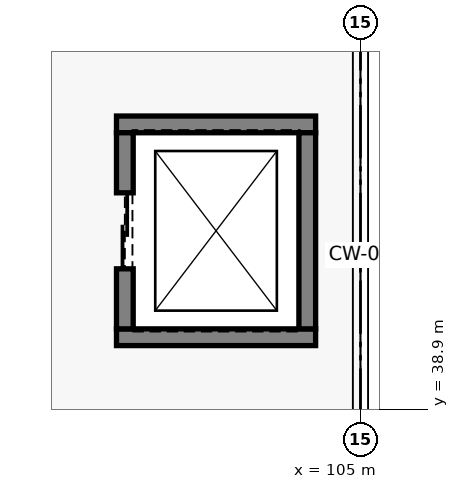
"""IFC4 building model, lengths in metres.
Left out: names, types, materials, properties, quantities, classifications, styles, units other than length and angle.
Written with IfcOpenShell. Run it as: python <this file> out.ifc"""

import sys

from ifc_helpers import new_model, si_unit, direction, frame, frame_2d, origin, place, context, subcontext, project, spatial, rectangle, extrude, element, fill, save


model = new_model("IFC4")
c1 = context("Model", 3, precision=1e-05, world=origin(), true_north=direction((0.0, 1.0)))
c2 = subcontext(c1, "Body", "Model", "MODEL_VIEW")
j1 = project(units=[si_unit("LENGTHUNIT", "METRE"), si_unit("PLANEANGLEUNIT", "RADIAN")], contexts=[c1])
p1 = place(None, origin())
s1 = spatial("IfcSite", under=j1, at=p1, CompositionType="ELEMENT")
p2 = place(p1, origin())
s2 = spatial("IfcBuilding", under=s1, at=p2, CompositionType="ELEMENT")
p3 = place(p2, frame((0.0, 0.0, 13.2)))
s3 = spatial("IfcBuildingStorey", under=s2, at=p3, CompositionType="ELEMENT", Elevation=13.2)
for number, where, z_axis, x_axis in (
    (1, (101.79, 39.85, 0.0), (0.0, 0.0, 1.0), (1.0, 0.0, 0.0)),
    (2, (101.79, 42.65, 0.0), (0.0, 0.0, 1.0), (1.0, 0.0, 0.0)),
):
    element("IfcWall", number, at=place(p3, frame(where, z_axis=z_axis, x_axis=x_axis)), inside=s3, PredefinedType="SOLIDWALL", context=c2, shape_type="SweptSolid", body=[
        extrude(rectangle(XDim=2.62, YDim=0.22, at=frame_2d((1.31, 0.0))), origin(), (0.0, 0.0, 1.0), 3.62),
    ])
p4 = place(p3, frame((101.9, 39.96, 0.0), z_axis=(0.0, 0.0, 1.0), x_axis=(0.0, 1.0, 0.0)))
e3 = element("IfcWall", 3, at=p4, inside=s3, PredefinedType="SOLIDWALL", context=c2, shape_type="SweptSolid", body=[
    extrude(rectangle(XDim=2.58, YDim=0.22, at=frame_2d((1.29, 0.0))), origin(), (0.0, 0.0, 1.0), 3.62),
])
p5 = place(p4, frame((0.79, 0.0, 0.0)))
e4 = element("IfcOpeningElement", 4, at=p5, cuts=e3, PredefinedType="OPENING", context=c2, shape_type="SweptSolid", body=[
    extrude(rectangle(XDim=1.0, YDim=2.15, at=frame_2d((0.5, 1.075))), frame((0.0, 0.12, 0.0), z_axis=(0.0, -1.0, 0.0), x_axis=(1.0, 0.0, 0.0)), (0.0, 0.0, 1.0), 0.24),
])
p6 = place(p3, frame((104.3, 39.96, 0.0), z_axis=(0.0, 0.0, 1.0), x_axis=(0.0, 1.0, 0.0)))
e5 = element("IfcWall", 5, at=p6, inside=s3, PredefinedType="SOLIDWALL", context=c2, shape_type="SweptSolid", body=[
    extrude(rectangle(XDim=2.58, YDim=0.22, at=frame_2d((1.29, 0.0))), origin(), (0.0, 0.0, 1.0), 3.62),
])
p7 = place(p5, origin())
e6 = element("IfcDoor", 6, at=p7, inside=s3, OperationType="SLIDING_TO_LEFT", PredefinedType="DOOR", context=c2, shape_type="SweptSolid", body=[
    extrude(rectangle(XDim=1.0, YDim=2.15, at=frame_2d((0.5, 1.075))), frame((0.0, 0.025, 0.0), z_axis=(0.0, -1.0, 0.0), x_axis=(1.0, 0.0, 0.0)), (0.0, 0.0, 1.0), 0.05),
])
fill(e4, e6)
save(model, sys.argv[1])
